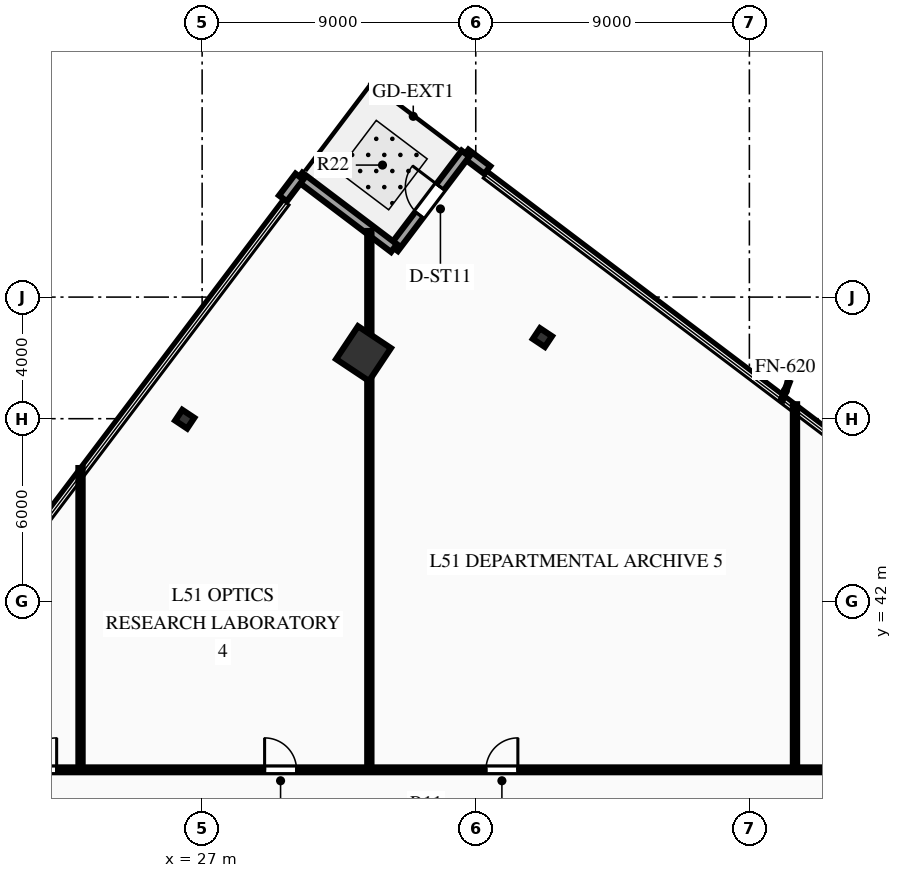
"""IFC4 building model, lengths in metres.
Left out: names, types, materials, properties, quantities, classifications, styles, units other than length and angle.
Written with IfcOpenShell. Run it as: python <this file> out.ifc"""

import sys

from ifc_helpers import new_model, si_unit, direction, frame, frame_2d, origin, origin_2d, place, context, subcontext, project, spatial, rectangle, hollow_rectangle, i_section, extrude, element, fill, save


model = new_model("IFC4")
c1 = context("Model", 3, precision=1e-05, world=origin(), true_north=direction((0.0, 1.0)))
c2 = subcontext(c1, "Body", "Model", "MODEL_VIEW")
j1 = project(units=[si_unit("LENGTHUNIT", "METRE"), si_unit("PLANEANGLEUNIT", "RADIAN")], contexts=[c1])
p1 = place(None, origin())
s1 = spatial("IfcSite", under=j1, at=p1, CompositionType="ELEMENT")
p2 = place(p1, origin())
s2 = spatial("IfcBuilding", under=s1, at=p2, CompositionType="ELEMENT")
p3 = place(p2, frame((0.0, 0.0, 205.95)))
s3 = spatial("IfcBuildingStorey", under=s2, at=p3, CompositionType="ELEMENT", Elevation=205.95)
p4 = place(p3, frame((32.308, 50.141, 0.0), z_axis=(0.0, 0.0, 1.0), x_axis=(0.554118199338, 0.832437998389, 0.0)))
e1 = element("IfcColumn", 1, at=p4, inside=s3, PredefinedType="COLUMN", context=c2, shape_type="SweptSolid", body=[
    extrude(hollow_rectangle(XDim=1.3, YDim=1.3, WallThickness=0.06, at=origin_2d()), origin(), (0.0, 0.0, 1.0), 3.75),
])
for number, where, z_axis, x_axis in (
    (2, (38.193, 50.668, 0.0), (0.0, 0.0, 1.0), (0.554, 0.832, 0.0)),
    (3, (26.428, 47.984, 0.0), (0.0, 0.0, 1.0), (0.554, 0.832, 0.0)),
):
    element("IfcColumn", number, at=place(p3, frame(where, z_axis=z_axis, x_axis=x_axis)), inside=s3, PredefinedType="COLUMN", context=c2, shape_type="SweptSolid", body=[
        extrude(i_section(OverallWidth=0.424, OverallDepth=0.474, WebThickness=0.048, FlangeThickness=0.077, at=origin_2d()), origin(), (0.0, 0.0, 1.0), 3.75),
    ])
p5 = place(p3, frame((35.663, 56.722, 0.0), z_axis=(0.0, 0.0, 1.0), x_axis=(0.797519262261, -0.603293482745, 0.0)))
e4 = element("IfcWall", 4, at=p5, inside=s3, PredefinedType="STANDARD", context=c2, shape_type="SweptSolid", body=[
    extrude(rectangle(XDim=0.9, YDim=0.32, at=frame_2d((0.45, 0.0))), origin(), (0.0, 0.0, 1.0), 3.47),
])
p6 = place(p3, frame((33.311, 53.611, 0.0), z_axis=(0.0, 0.0, 1.0), x_axis=(0.603210272784, 0.797582200659, 0.0)))
e5 = element("IfcWall", 5, at=p6, inside=s3, PredefinedType="STANDARD", context=c2, shape_type="SweptSolid", body=[
    extrude(rectangle(XDim=3.9, YDim=0.32, at=frame_2d((1.95, 0.0))), origin(), (0.0, 0.0, 1.0), 3.47),
])
p7 = place(p6, frame((1.375, 0.0, 0.0)))
e6 = element("IfcOpeningElement", 6, at=p7, cuts=e5, PredefinedType="OPENING", context=c2, shape_type="SweptSolid", body=[
    extrude(rectangle(XDim=1.15, YDim=2.2, at=frame_2d((0.575, 1.1))), frame((0.0, 0.17, 0.0), z_axis=(0.0, -1.0, 0.0), x_axis=(1.0, 0.0, 0.0)), (0.0, 0.0, 1.0), 0.34),
])
p8 = place(p3, frame((30.2, 55.963, 0.0), z_axis=(0.0, 0.0, 1.0), x_axis=(0.797612318108, -0.603170448549, 0.0)))
e7 = element("IfcWall", 7, at=p8, inside=s3, PredefinedType="STANDARD", context=c2, shape_type="SweptSolid", body=[
    extrude(rectangle(XDim=3.9, YDim=0.32, at=frame_2d((1.95, 0.0))), origin(), (0.0, 0.0, 1.0), 3.47),
])
p9 = place(p3, frame((29.657, 55.246, 0.0), z_axis=(0.0, 0.0, 1.0), x_axis=(0.603120905781, 0.797649780925, 0.0)))
e8 = element("IfcWall", 8, at=p9, inside=s3, PredefinedType="STANDARD", context=c2, shape_type="SweptSolid", body=[
    extrude(rectangle(XDim=0.9, YDim=0.32, at=frame_2d((0.45, 0.0))), origin(), (0.0, 0.0, 1.0), 3.47),
])
p10 = place(p3, frame((18.2, 36.45, 0.0), z_axis=(0.0, 0.0, 1.0), x_axis=(1.0, 0.0, 0.0)))
e9 = element("IfcWall", 9, at=p10, inside=s3, PredefinedType="PARTITIONING", context=c2, shape_type="SweptSolid", body=[
    extrude(rectangle(XDim=35.6, YDim=0.16, at=frame_2d((17.8, 0.0))), origin(), (0.0, 0.0, 1.0), 2.849),
])
p11 = place(p10, frame((2.965, 0.0, 0.0)))
e10 = element("IfcOpeningElement", 10, at=p11, cuts=e9, PredefinedType="OPENING", context=c2, shape_type="SweptSolid", body=[
    extrude(rectangle(XDim=1.05, YDim=2.15, at=frame_2d((0.525, 1.075))), frame((0.0, 0.09, 0.0), z_axis=(0.0, -1.0, 0.0), x_axis=(1.0, 0.0, 0.0)), (0.0, 0.0, 1.0), 0.18),
])
p12 = place(p10, frame((10.855, 0.0, 0.0)))
e11 = element("IfcOpeningElement", 11, at=p12, cuts=e9, PredefinedType="OPENING", context=c2, shape_type="SweptSolid", body=[
    extrude(rectangle(XDim=1.05, YDim=2.15, at=frame_2d((0.525, 1.075))), frame((0.0, 0.09, 0.0), z_axis=(0.0, -1.0, 0.0), x_axis=(1.0, 0.0, 0.0)), (0.0, 0.0, 1.0), 0.18),
])
p13 = place(p10, frame((18.135, 0.0, 0.0)))
e12 = element("IfcOpeningElement", 12, at=p13, cuts=e9, PredefinedType="OPENING", context=c2, shape_type="SweptSolid", body=[
    extrude(rectangle(XDim=1.05, YDim=2.15, at=frame_2d((0.525, 1.075))), frame((0.0, 0.09, 0.0), z_axis=(0.0, -1.0, 0.0), x_axis=(1.0, 0.0, 0.0)), (0.0, 0.0, 1.0), 0.18),
])
p14 = place(p10, frame((32.175, 0.0, 0.0)))
e13 = element("IfcOpeningElement", 13, at=p14, cuts=e9, PredefinedType="OPENING", context=c2, shape_type="SweptSolid", body=[
    extrude(rectangle(XDim=1.05, YDim=2.15, at=frame_2d((0.525, 1.075))), frame((0.0, 0.09, 0.0), z_axis=(0.0, -1.0, 0.0), x_axis=(1.0, 0.0, 0.0)), (0.0, 0.0, 1.0), 0.18),
])
p15 = place(p3, frame((23.0, 36.45, 0.0), z_axis=(0.0, 0.0, 1.0), x_axis=(0.0, 1.0, 0.0)))
e14 = element("IfcWall", 14, at=p15, inside=s3, PredefinedType="PARTITIONING", context=c2, shape_type="SweptSolid", body=[
    extrude(rectangle(XDim=9.927, YDim=0.14, at=frame_2d((4.963, 0.0))), origin(), (0.0, 0.0, 1.0), 3.47),
])
p16 = place(p3, frame((32.5, 36.45, 0.0), z_axis=(0.0, 0.0, 1.0), x_axis=(0.0, 1.0, 0.0)))
e15 = element("IfcWall", 15, at=p16, inside=s3, PredefinedType="PARTITIONING", context=c2, shape_type="SweptSolid", body=[
    extrude(rectangle(XDim=17.724, YDim=0.14, at=frame_2d((8.862, 0.0))), origin(), (0.0, 0.0, 1.0), 2.849),
])
p17 = place(p3, frame((46.5, 36.45, 0.0), z_axis=(0.0, 0.0, 1.0), x_axis=(0.0, 1.0, 0.0)))
e16 = element("IfcWall", 16, at=p17, inside=s3, PredefinedType="PARTITIONING", context=c2, shape_type="SweptSolid", body=[
    extrude(rectangle(XDim=12.026, YDim=0.14, at=frame_2d((6.013, 0.0))), origin(), (0.0, 0.0, 1.0), 2.849),
])
p18 = place(p7, origin())
e17 = element("IfcDoor", 17, at=p18, inside=s3, OperationType="SINGLE_SWING_RIGHT", PredefinedType="DOOR", context=c2, shape_type="SweptSolid", body=[
    extrude(rectangle(XDim=1.15, YDim=2.2, at=frame_2d((0.575, 1.1))), frame((0.0, 0.025, 0.0), z_axis=(0.0, -1.0, 0.0), x_axis=(1.0, 0.0, 0.0)), (0.0, 0.0, 1.0), 0.05),
])
fill(e6, e17)
p19 = place(p11, origin())
e18 = element("IfcDoor", 18, at=p19, inside=s3, OperationType="SINGLE_SWING_RIGHT", PredefinedType="DOOR", context=c2, shape_type="SweptSolid", body=[
    extrude(rectangle(XDim=1.05, YDim=2.15, at=frame_2d((0.525, 1.075))), frame((0.0, 0.025, 0.0), z_axis=(0.0, -1.0, 0.0), x_axis=(1.0, 0.0, 0.0)), (0.0, 0.0, 1.0), 0.05),
])
fill(e10, e18)
p20 = place(p12, origin())
e19 = element("IfcDoor", 19, at=p20, inside=s3, OperationType="SINGLE_SWING_LEFT", PredefinedType="DOOR", context=c2, shape_type="SweptSolid", body=[
    extrude(rectangle(XDim=1.05, YDim=2.15, at=frame_2d((0.525, 1.075))), frame((0.0, 0.025, 0.0), z_axis=(0.0, -1.0, 0.0), x_axis=(1.0, 0.0, 0.0)), (0.0, 0.0, 1.0), 0.05),
])
fill(e11, e19)
p21 = place(p13, origin())
e20 = element("IfcDoor", 20, at=p21, inside=s3, OperationType="SINGLE_SWING_RIGHT", PredefinedType="DOOR", context=c2, shape_type="SweptSolid", body=[
    extrude(rectangle(XDim=1.05, YDim=2.15, at=frame_2d((0.525, 1.075))), frame((0.0, 0.025, 0.0), z_axis=(0.0, -1.0, 0.0), x_axis=(1.0, 0.0, 0.0)), (0.0, 0.0, 1.0), 0.05),
])
fill(e12, e20)
save(model, sys.argv[1])
